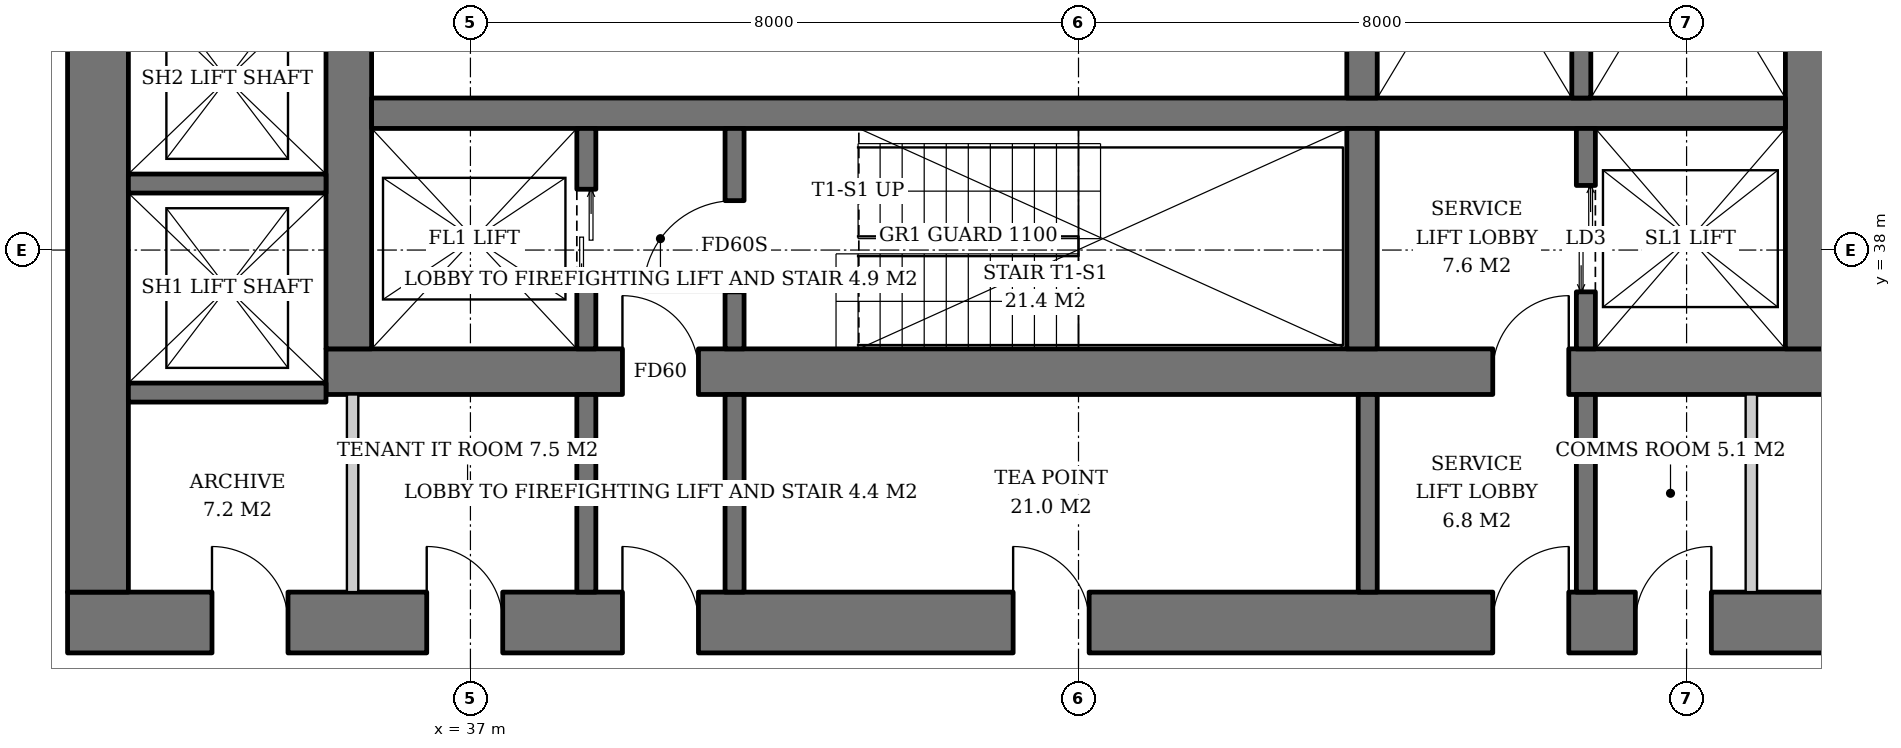
"""IFC4 building model, lengths in metres.
Left out: names, types, materials, properties, quantities, classifications, styles, units other than length and angle.
Written with IfcOpenShell. Run it as: python <this file> out.ifc"""

import sys

from ifc_helpers import new_model, si_unit, direction, frame, frame_2d, origin, place, context, subcontext, project, spatial, rectangle, extrude, element, fill, save


model = new_model("IFC4")
c1 = context("Model", 3, precision=1e-05, world=origin(), true_north=direction((0.0, 1.0)))
c2 = subcontext(c1, "Body", "Model", "MODEL_VIEW")
j1 = project(units=[si_unit("LENGTHUNIT", "METRE"), si_unit("PLANEANGLEUNIT", "RADIAN")], contexts=[c1])
p1 = place(None, origin())
s1 = spatial("IfcSite", under=j1, at=p1, CompositionType="ELEMENT")
p2 = place(p1, origin())
s2 = spatial("IfcBuilding", under=s1, at=p2, CompositionType="ELEMENT")
p3 = place(p2, frame((0.0, 0.0, 32.4)))
s3 = spatial("IfcBuildingStorey", under=s2, at=p3, CompositionType="ELEMENT", Elevation=32.4)
p4 = place(p3, frame((35.1, 36.4, 0.0), z_axis=(0.0, 0.0, 1.0), x_axis=(1.0, 0.0, 0.0)))
e1 = element("IfcWall", 1, at=p4, inside=s3, PredefinedType="SHEAR", context=c2, shape_type="SweptSolid", body=[
    extrude(rectangle(XDim=19.8, YDim=0.6, at=frame_2d((9.9, 0.0))), origin(), (0.0, 0.0, 1.0), 3.8),
])
p5 = place(p4, frame((3.9, 0.0, 0.0)))
e2 = element("IfcOpeningElement", 2, at=p5, cuts=e1, PredefinedType="OPENING", context=c2, shape_type="SweptSolid", body=[
    extrude(rectangle(XDim=1.0, YDim=2.1, at=frame_2d((0.5, 1.05))), frame((0.0, 0.31, 0.0), z_axis=(0.0, -1.0, 0.0), x_axis=(1.0, 0.0, 0.0)), (0.0, 0.0, 1.0), 0.62),
])
p6 = place(p4, frame((15.35, 0.0, 0.0)))
e3 = element("IfcOpeningElement", 3, at=p6, cuts=e1, PredefinedType="OPENING", context=c2, shape_type="SweptSolid", body=[
    extrude(rectangle(XDim=1.0, YDim=2.1, at=frame_2d((0.5, 1.05))), frame((0.0, 0.31, 0.0), z_axis=(0.0, -1.0, 0.0), x_axis=(1.0, 0.0, 0.0)), (0.0, 0.0, 1.0), 0.62),
])
p7 = place(p3, frame((35.4, 36.7, 0.0), z_axis=(0.0, 0.0, 1.0), x_axis=(0.0, 1.0, 0.0)))
e4 = element("IfcWall", 4, at=p7, inside=s3, PredefinedType="SHEAR", context=c2, shape_type="SweptSolid", body=[
    extrude(rectangle(XDim=18.6, YDim=0.6, at=frame_2d((9.3, 0.0))), origin(), (0.0, 0.0, 1.0), 3.8),
])
p8 = place(p7, frame((8.4, 0.0, 0.0)))
e5 = element("IfcOpeningElement", 5, at=p8, cuts=e4, PredefinedType="OPENING", context=c2, shape_type="SweptSolid", body=[
    extrude(rectangle(XDim=1.8, YDim=2.4, at=frame_2d((0.9, 1.2))), frame((0.0, 0.31, 0.0), z_axis=(0.0, -1.0, 0.0), x_axis=(1.0, 0.0, 0.0)), (0.0, 0.0, 1.0), 0.62),
])
p9 = place(p3, frame((54.6, 36.7, 0.0), z_axis=(0.0, 0.0, 1.0), x_axis=(0.0, 1.0, 0.0)))
e6 = element("IfcWall", 6, at=p9, inside=s3, PredefinedType="SHEAR", context=c2, shape_type="SweptSolid", body=[
    extrude(rectangle(XDim=18.6, YDim=0.6, at=frame_2d((9.3, 0.0))), origin(), (0.0, 0.0, 1.0), 3.8),
])
p10 = place(p9, frame((8.4, 0.0, 0.0)))
e7 = element("IfcOpeningElement", 7, at=p10, cuts=e6, PredefinedType="OPENING", context=c2, shape_type="SweptSolid", body=[
    extrude(rectangle(XDim=1.8, YDim=2.4, at=frame_2d((0.9, 1.2))), frame((0.0, 0.31, 0.0), z_axis=(0.0, -1.0, 0.0), x_axis=(1.0, 0.0, 0.0)), (0.0, 0.0, 1.0), 0.62),
])
p11 = place(p3, frame((31.7, 33.1, 0.0), z_axis=(0.0, 0.0, 1.0), x_axis=(1.0, 0.0, 0.0)))
e8 = element("IfcWall", 8, at=p11, inside=s3, PredefinedType="SHEAR", context=c2, shape_type="SweptSolid", body=[
    extrude(rectangle(XDim=26.6, YDim=0.8, at=frame_2d((13.3, 0.0))), origin(), (0.0, 0.0, 1.0), 3.8),
])
p12 = place(p11, frame((7.3, 0.0, 0.0)))
e9 = element("IfcOpeningElement", 9, at=p12, cuts=e8, PredefinedType="OPENING", context=c2, shape_type="SweptSolid", body=[
    extrude(rectangle(XDim=1.0, YDim=2.1, at=frame_2d((0.5, 1.05))), frame((0.0, 0.41, 0.0), z_axis=(0.0, -1.0, 0.0), x_axis=(1.0, 0.0, 0.0)), (0.0, 0.0, 1.0), 0.82),
])
p13 = place(p11, frame((18.75, 0.0, 0.0)))
e10 = element("IfcOpeningElement", 10, at=p13, cuts=e8, PredefinedType="OPENING", context=c2, shape_type="SweptSolid", body=[
    extrude(rectangle(XDim=1.0, YDim=2.1, at=frame_2d((0.5, 1.05))), frame((0.0, 0.41, 0.0), z_axis=(0.0, -1.0, 0.0), x_axis=(1.0, 0.0, 0.0)), (0.0, 0.0, 1.0), 0.82),
])
p14 = place(p11, frame((1.9, 0.0, 0.0)))
e11 = element("IfcOpeningElement", 11, at=p14, cuts=e8, PredefinedType="OPENING", context=c2, shape_type="SweptSolid", body=[
    extrude(rectangle(XDim=1.0, YDim=2.1, at=frame_2d((0.5, 1.05))), frame((0.0, 0.41, 0.0), z_axis=(0.0, -1.0, 0.0), x_axis=(1.0, 0.0, 0.0)), (0.0, 0.0, 1.0), 0.82),
])
p15 = place(p11, frame((4.725, 0.0, 0.0)))
e12 = element("IfcOpeningElement", 12, at=p15, cuts=e8, PredefinedType="OPENING", context=c2, shape_type="SweptSolid", body=[
    extrude(rectangle(XDim=1.0, YDim=2.1, at=frame_2d((0.5, 1.05))), frame((0.0, 0.41, 0.0), z_axis=(0.0, -1.0, 0.0), x_axis=(1.0, 0.0, 0.0)), (0.0, 0.0, 1.0), 0.82),
])
p16 = place(p11, frame((12.44, 0.0, 0.0)))
e13 = element("IfcOpeningElement", 13, at=p16, cuts=e8, PredefinedType="OPENING", context=c2, shape_type="SweptSolid", body=[
    extrude(rectangle(XDim=1.0, YDim=2.1, at=frame_2d((0.5, 1.05))), frame((0.0, 0.41, 0.0), z_axis=(0.0, -1.0, 0.0), x_axis=(1.0, 0.0, 0.0)), (0.0, 0.0, 1.0), 0.82),
])
p17 = place(p11, frame((20.626, 0.0, 0.0)))
e14 = element("IfcOpeningElement", 14, at=p17, cuts=e8, PredefinedType="OPENING", context=c2, shape_type="SweptSolid", body=[
    extrude(rectangle(XDim=1.0, YDim=2.1, at=frame_2d((0.5, 1.05))), frame((0.0, 0.41, 0.0), z_axis=(0.0, -1.0, 0.0), x_axis=(1.0, 0.0, 0.0)), (0.0, 0.0, 1.0), 0.82),
])
p18 = place(p11, frame((23.476, 0.0, 0.0)))
e15 = element("IfcOpeningElement", 15, at=p18, cuts=e8, PredefinedType="OPENING", context=c2, shape_type="SweptSolid", body=[
    extrude(rectangle(XDim=1.0, YDim=2.1, at=frame_2d((0.5, 1.05))), frame((0.0, 0.41, 0.0), z_axis=(0.0, -1.0, 0.0), x_axis=(1.0, 0.0, 0.0)), (0.0, 0.0, 1.0), 0.82),
])
p19 = place(p3, frame((32.1, 33.5, 0.0), z_axis=(0.0, 0.0, 1.0), x_axis=(0.0, 1.0, 0.0)))
e16 = element("IfcWall", 16, at=p19, inside=s3, PredefinedType="SHEAR", context=c2, shape_type="SweptSolid", body=[
    extrude(rectangle(XDim=25.0, YDim=0.8, at=frame_2d((12.5, 0.0))), origin(), (0.0, 0.0, 1.0), 3.8),
])
p20 = place(p19, frame((11.6, 0.0, 0.0)))
e17 = element("IfcOpeningElement", 17, at=p20, cuts=e16, PredefinedType="OPENING", context=c2, shape_type="SweptSolid", body=[
    extrude(rectangle(XDim=1.8, YDim=2.4, at=frame_2d((0.9, 1.2))), frame((0.0, 0.41, 0.0), z_axis=(0.0, -1.0, 0.0), x_axis=(1.0, 0.0, 0.0)), (0.0, 0.0, 1.0), 0.82),
])
p21 = place(p3, frame((35.7, 39.8, 0.0), z_axis=(0.0, 0.0, 1.0), x_axis=(1.0, 0.0, 0.0)))
e18 = element("IfcWall", 18, at=p21, inside=s3, PredefinedType="SHEAR", context=c2, shape_type="SweptSolid", body=[
    extrude(rectangle(XDim=18.6, YDim=0.4, at=frame_2d((9.3, 0.0))), origin(), (0.0, 0.0, 1.0), 3.8),
])
p22 = place(p3, frame((48.73, 36.7, 0.0), z_axis=(0.0, 0.0, 1.0), x_axis=(0.0, 1.0, 0.0)))
e19 = element("IfcWall", 19, at=p22, inside=s3, PredefinedType="SHEAR", context=c2, shape_type="SweptSolid", body=[
    extrude(rectangle(XDim=2.9, YDim=0.4, at=frame_2d((1.45, 0.0))), origin(), (0.0, 0.0, 1.0), 3.8),
])
p23 = place(p3, frame((48.73, 40.0, 0.0), z_axis=(0.0, 0.0, 1.0), x_axis=(0.0, 1.0, 0.0)))
e20 = element("IfcWall", 20, at=p23, inside=s3, PredefinedType="SHEAR", context=c2, shape_type="SweptSolid", body=[
    extrude(rectangle(XDim=12.0, YDim=0.4, at=frame_2d((6.0, 0.0))), origin(), (0.0, 0.0, 1.0), 3.8),
])
p24 = place(p3, frame((38.525, 36.7, 0.0), z_axis=(0.0, 0.0, 1.0), x_axis=(0.0, 1.0, 0.0)))
e21 = element("IfcWall", 21, at=p24, inside=s3, PredefinedType="SHEAR", context=c2, shape_type="SweptSolid", body=[
    extrude(rectangle(XDim=2.9, YDim=0.25, at=frame_2d((1.45, 0.0))), origin(), (0.0, 0.0, 1.0), 3.8),
])
p25 = place(p24, frame((0.8, 0.0, 0.0)))
e22 = element("IfcOpeningElement", 22, at=p25, cuts=e21, PredefinedType="OPENING", context=c2, shape_type="SweptSolid", body=[
    extrude(rectangle(XDim=1.3, YDim=2.2, at=frame_2d((0.65, 1.1))), frame((0.0, 0.135, 0.0), z_axis=(0.0, -1.0, 0.0), x_axis=(1.0, 0.0, 0.0)), (0.0, 0.0, 1.0), 0.27),
])
p26 = place(p3, frame((40.475, 36.7, 0.0), z_axis=(0.0, 0.0, 1.0), x_axis=(0.0, 1.0, 0.0)))
e23 = element("IfcWall", 23, at=p26, inside=s3, PredefinedType="SHEAR", context=c2, shape_type="SweptSolid", body=[
    extrude(rectangle(XDim=2.9, YDim=0.25, at=frame_2d((1.45, 0.0))), origin(), (0.0, 0.0, 1.0), 3.8),
])
p27 = place(p26, frame((0.75, 0.0, 0.0)))
e24 = element("IfcOpeningElement", 24, at=p27, cuts=e23, PredefinedType="OPENING", context=c2, shape_type="SweptSolid", body=[
    extrude(rectangle(XDim=1.2, YDim=2.1, at=frame_2d((0.6, 1.05))), frame((0.0, 0.135, 0.0), z_axis=(0.0, -1.0, 0.0), x_axis=(1.0, 0.0, 0.0)), (0.0, 0.0, 1.0), 0.27),
])
p28 = place(p3, frame((51.675, 36.7, 0.0), z_axis=(0.0, 0.0, 1.0), x_axis=(0.0, 1.0, 0.0)))
e25 = element("IfcWall", 25, at=p28, inside=s3, PredefinedType="SHEAR", context=c2, shape_type="SweptSolid", body=[
    extrude(rectangle(XDim=2.9, YDim=0.25, at=frame_2d((1.45, 0.0))), origin(), (0.0, 0.0, 1.0), 3.8),
])
p29 = place(p28, frame((0.75, 0.0, 0.0)))
e26 = element("IfcOpeningElement", 26, at=p29, cuts=e25, PredefinedType="OPENING", context=c2, shape_type="SweptSolid", body=[
    extrude(rectangle(XDim=1.4, YDim=2.4, at=frame_2d((0.7, 1.2))), frame((0.0, 0.135, 0.0), z_axis=(0.0, -1.0, 0.0), x_axis=(1.0, 0.0, 0.0)), (0.0, 0.0, 1.0), 0.27),
])
p30 = place(p3, frame((51.615, 44.25, 0.0), z_axis=(0.0, 0.0, 1.0), x_axis=(0.0, -1.0, 0.0)))
e27 = element("IfcWall", 27, at=p30, inside=s3, PredefinedType="SHEAR", context=c2, shape_type="SweptSolid", body=[
    extrude(rectangle(XDim=4.25, YDim=0.25, at=frame_2d((2.125, 0.0))), origin(), (0.0, 0.0, 1.0), 3.8),
])
for number, where, z_axis, x_axis in (
    (28, (32.5, 36.125, 0.0), (0.0, 0.0, 1.0), (1.0, 0.0, 0.0)),
    (29, (32.5, 38.875, 0.0), (0.0, 0.0, 1.0), (1.0, 0.0, 0.0)),
):
    element("IfcWall", number, at=place(p3, frame(where, z_axis=z_axis, x_axis=x_axis)), inside=s3, PredefinedType="SHEAR", context=c2, shape_type="SweptSolid", body=[
        extrude(rectangle(XDim=2.6, YDim=0.25, at=frame_2d((1.3, 0.0))), origin(), (0.0, 0.0, 1.0), 3.8),
    ])
for number, where, z_axis, x_axis in (
    (30, (38.525, 33.5, 0.0), (0.0, 0.0, 1.0), (0.0, 1.0, 0.0)),
    (31, (40.475, 33.5, 0.0), (0.0, 0.0, 1.0), (0.0, 1.0, 0.0)),
    (32, (48.805, 33.5, 0.0), (0.0, 0.0, 1.0), (0.0, 1.0, 0.0)),
    (33, (51.675, 33.5, 0.0), (0.0, 0.0, 1.0), (0.0, 1.0, 0.0)),
):
    element("IfcWall", number, at=place(p3, frame(where, z_axis=z_axis, x_axis=x_axis)), inside=s3, PredefinedType="SOLIDWALL", context=c2, shape_type="SweptSolid", body=[
        extrude(rectangle(XDim=2.6, YDim=0.25, at=frame_2d((1.3, 0.0))), origin(), (0.0, 0.0, 1.0), 3.62),
    ])
for number, where, z_axis, x_axis in (
    (34, (35.45, 33.5, 0.0), (0.0, 0.0, 1.0), (0.0, 1.0, 0.0)),
    (35, (53.852, 33.5, 0.0), (0.0, 0.0, 1.0), (0.0, 1.0, 0.0)),
):
    element("IfcWall", number, at=place(p3, frame(where, z_axis=z_axis, x_axis=x_axis)), inside=s3, PredefinedType="SOLIDWALL", context=c2, shape_type="SweptSolid", body=[
        extrude(rectangle(XDim=2.6, YDim=0.15, at=frame_2d((1.3, 0.0))), origin(), (0.0, 0.0, 1.0), 3.62),
    ])
p31 = place(p25, origin())
e36 = element("IfcDoor", 36, at=p31, inside=s3, OperationType="DOUBLE_DOOR_SLIDING", PredefinedType="DOOR", context=c2, shape_type="SweptSolid", body=[
    extrude(rectangle(XDim=1.3, YDim=2.2, at=frame_2d((0.65, 1.1))), frame((0.0, 0.025, 0.0), z_axis=(0.0, -1.0, 0.0), x_axis=(1.0, 0.0, 0.0)), (0.0, 0.0, 1.0), 0.05),
])
fill(e22, e36)
p32 = place(p27, origin())
e37 = element("IfcDoor", 37, at=p32, inside=s3, OperationType="SINGLE_SWING_LEFT", PredefinedType="DOOR", context=c2, shape_type="SweptSolid", body=[
    extrude(rectangle(XDim=1.2, YDim=2.1, at=frame_2d((0.6, 1.05))), frame((0.0, 0.025, 0.0), z_axis=(0.0, -1.0, 0.0), x_axis=(1.0, 0.0, 0.0)), (0.0, 0.0, 1.0), 0.05),
])
fill(e24, e37)
p33 = place(p29, origin())
e38 = element("IfcDoor", 38, at=p33, inside=s3, OperationType="DOUBLE_DOOR_SLIDING", PredefinedType="DOOR", context=c2, shape_type="SweptSolid", body=[
    extrude(rectangle(XDim=1.4, YDim=2.4, at=frame_2d((0.7, 1.2))), frame((0.0, 0.025, 0.0), z_axis=(0.0, -1.0, 0.0), x_axis=(1.0, 0.0, 0.0)), (0.0, 0.0, 1.0), 0.05),
])
fill(e26, e38)
p34 = place(p5, origin())
e39 = element("IfcDoor", 39, at=p34, inside=s3, OperationType="SINGLE_SWING_LEFT", PredefinedType="DOOR", context=c2, shape_type="SweptSolid", body=[
    extrude(rectangle(XDim=1.0, YDim=2.1, at=frame_2d((0.5, 1.05))), frame((0.0, 0.025, 0.0), z_axis=(0.0, -1.0, 0.0), x_axis=(1.0, 0.0, 0.0)), (0.0, 0.0, 1.0), 0.05),
])
fill(e2, e39)
p35 = place(p6, origin())
e40 = element("IfcDoor", 40, at=p35, inside=s3, OperationType="SINGLE_SWING_RIGHT", PredefinedType="DOOR", context=c2, shape_type="SweptSolid", body=[
    extrude(rectangle(XDim=1.0, YDim=2.1, at=frame_2d((0.5, 1.05))), frame((0.0, 0.025, 0.0), z_axis=(0.0, -1.0, 0.0), x_axis=(1.0, 0.0, 0.0)), (0.0, 0.0, 1.0), 0.05),
])
fill(e3, e40)
p36 = place(p12, origin())
e41 = element("IfcDoor", 41, at=p36, inside=s3, OperationType="SINGLE_SWING_LEFT", PredefinedType="DOOR", context=c2, shape_type="SweptSolid", body=[
    extrude(rectangle(XDim=1.0, YDim=2.1, at=frame_2d((0.5, 1.05))), frame((0.0, 0.025, 0.0), z_axis=(0.0, -1.0, 0.0), x_axis=(1.0, 0.0, 0.0)), (0.0, 0.0, 1.0), 0.05),
])
fill(e9, e41)
p37 = place(p13, origin())
e42 = element("IfcDoor", 42, at=p37, inside=s3, OperationType="SINGLE_SWING_RIGHT", PredefinedType="DOOR", context=c2, shape_type="SweptSolid", body=[
    extrude(rectangle(XDim=1.0, YDim=2.1, at=frame_2d((0.5, 1.05))), frame((0.0, 0.025, 0.0), z_axis=(0.0, -1.0, 0.0), x_axis=(1.0, 0.0, 0.0)), (0.0, 0.0, 1.0), 0.05),
])
fill(e10, e42)
p38 = place(p14, origin())
e43 = element("IfcDoor", 43, at=p38, inside=s3, OperationType="SINGLE_SWING_LEFT", PredefinedType="DOOR", context=c2, shape_type="SweptSolid", body=[
    extrude(rectangle(XDim=1.0, YDim=2.1, at=frame_2d((0.5, 1.05))), frame((0.0, 0.39, 0.0), z_axis=(0.0, -1.0, 0.0), x_axis=(1.0, 0.0, 0.0)), (0.0, 0.0, 1.0), 0.05),
])
fill(e11, e43)
p39 = place(p15, origin())
e44 = element("IfcDoor", 44, at=p39, inside=s3, OperationType="SINGLE_SWING_LEFT", PredefinedType="DOOR", context=c2, shape_type="SweptSolid", body=[
    extrude(rectangle(XDim=1.0, YDim=2.1, at=frame_2d((0.5, 1.05))), frame((0.0, 0.39, 0.0), z_axis=(0.0, -1.0, 0.0), x_axis=(1.0, 0.0, 0.0)), (0.0, 0.0, 1.0), 0.05),
])
fill(e12, e44)
p40 = place(p16, origin())
e45 = element("IfcDoor", 45, at=p40, inside=s3, OperationType="SINGLE_SWING_LEFT", PredefinedType="DOOR", context=c2, shape_type="SweptSolid", body=[
    extrude(rectangle(XDim=1.0, YDim=2.1, at=frame_2d((0.5, 1.05))), frame((0.0, 0.39, 0.0), z_axis=(0.0, -1.0, 0.0), x_axis=(1.0, 0.0, 0.0)), (0.0, 0.0, 1.0), 0.05),
])
fill(e13, e45)
p41 = place(p17, origin())
e46 = element("IfcDoor", 46, at=p41, inside=s3, OperationType="SINGLE_SWING_RIGHT", PredefinedType="DOOR", context=c2, shape_type="SweptSolid", body=[
    extrude(rectangle(XDim=1.0, YDim=2.1, at=frame_2d((0.5, 1.05))), frame((0.0, 0.39, 0.0), z_axis=(0.0, -1.0, 0.0), x_axis=(1.0, 0.0, 0.0)), (0.0, 0.0, 1.0), 0.05),
])
fill(e14, e46)
save(model, sys.argv[1])
